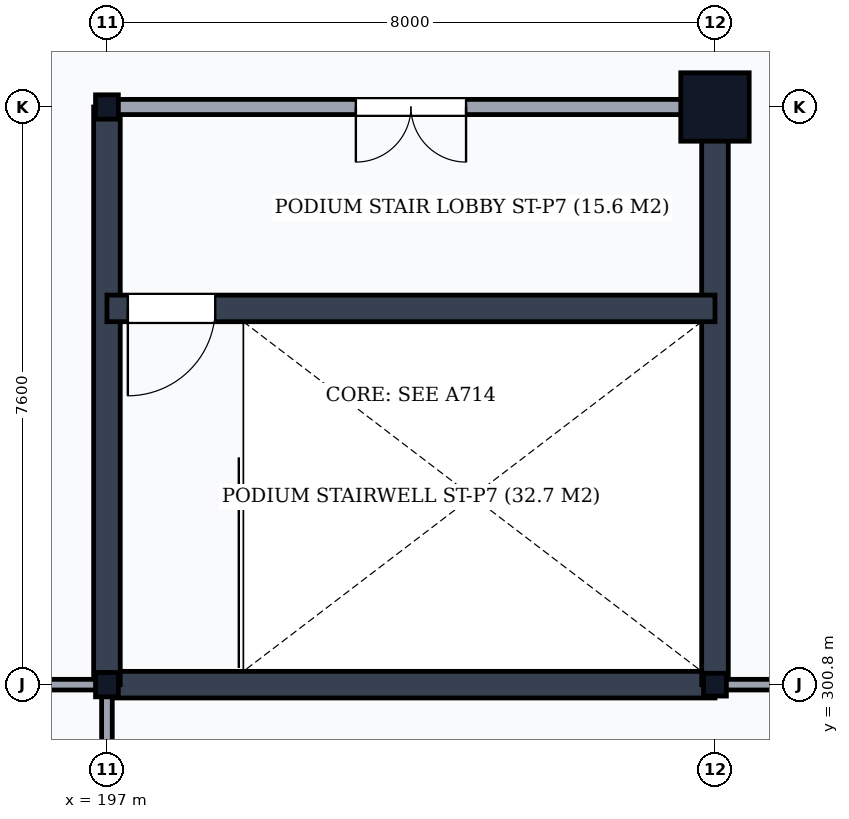
"""IFC4 building model, lengths in metres.
Left out: names, types, materials, properties, quantities, classifications, styles, units other than length and angle.
Written with IfcOpenShell. Run it as: python <this file> out.ifc"""

import sys

from ifc_helpers import new_model, si_unit, direction, frame, frame_2d, origin, origin_2d, place, context, subcontext, project, spatial, rectangle, circle, i_section, extrude, element, fill, save


model = new_model("IFC4")
c1 = context("Model", 3, precision=1e-05, world=origin(), true_north=direction((0.0, 1.0)))
c2 = subcontext(c1, "Body", "Model", "MODEL_VIEW")
j1 = project(units=[si_unit("LENGTHUNIT", "METRE"), si_unit("PLANEANGLEUNIT", "RADIAN")], contexts=[c1])
p1 = place(None, origin())
s1 = spatial("IfcSite", under=j1, at=p1, CompositionType="ELEMENT")
p2 = place(p1, origin())
s2 = spatial("IfcBuilding", under=s1, at=p2, CompositionType="ELEMENT")
p3 = place(p2, frame((0.0, 0.0, 15.6)))
s3 = spatial("IfcBuildingStorey", under=s2, at=p3, CompositionType="ELEMENT", Elevation=15.6)
for number, where, z_axis, x_axis in (
    (1, (197.0, 300.8, 0.0), (0.0, 0.0, 1.0), (1.0, 0.0, 0.0)),
    (2, (197.0, 308.4, 0.0), (0.0, 0.0, 1.0), (1.0, 0.0, 0.0)),
):
    element("IfcColumn", number, at=place(p3, frame(where, z_axis=z_axis, x_axis=x_axis)), inside=s3, PredefinedType="COLUMN", context=c2, shape_type="SweptSolid", body=[
        extrude(i_section(OverallWidth=0.3, OverallDepth=0.32, WebThickness=0.011, FlangeThickness=0.021, FilletRadius=0.027, at=origin_2d()), origin(), (0.0, 0.0, 1.0), 4.8),
    ])
p4 = place(p3, frame((205.0, 300.8, 0.0), z_axis=(0.0, 0.0, 1.0), x_axis=(1.0, 0.0, 0.0)))
e3 = element("IfcColumn", 3, at=p4, inside=s3, PredefinedType="COLUMN", context=c2, shape_type="SweptSolid", body=[
    extrude(i_section(OverallWidth=0.3, OverallDepth=0.3, WebThickness=0.011, FlangeThickness=0.019, FilletRadius=0.027, at=origin_2d()), origin(), (0.0, 0.0, 1.0), 4.8),
])
p5 = place(p3, frame((205.0, 308.4, 0.0), z_axis=(0.0, 0.0, 1.0), x_axis=(1.0, 0.0, 0.0)))
e4 = element("IfcColumn", 4, at=p5, inside=s3, PredefinedType="COLUMN", context=c2, shape_type="SweptSolid", body=[
    extrude(circle(Radius=0.45, at=origin_2d()), origin(), (0.0, 0.0, 1.0), 4.8),
])
p6 = place(p3, frame((197.0, 300.8, 0.0), z_axis=(0.0, 0.0, 1.0), x_axis=(1.0, 0.0, 0.0)))
e5 = element("IfcWall", 5, at=p6, inside=s3, PredefinedType="SHEAR", context=c2, shape_type="SweptSolid", body=[
    extrude(rectangle(XDim=8.0, YDim=0.35, at=frame_2d((4.0, 0.0))), origin(), (0.0, 0.0, 1.0), 4.48),
])
for number, where, z_axis, x_axis in (
    (6, (197.0, 300.8, 0.0), (0.0, 0.0, 1.0), (0.0, 1.0, 0.0)),
    (7, (205.0, 300.8, 0.0), (0.0, 0.0, 1.0), (0.0, 1.0, 0.0)),
):
    element("IfcWall", number, at=place(p3, frame(where, z_axis=z_axis, x_axis=x_axis)), inside=s3, PredefinedType="SHEAR", context=c2, shape_type="SweptSolid", body=[
        extrude(rectangle(XDim=7.6, YDim=0.35, at=frame_2d((3.8, 0.0))), origin(), (0.0, 0.0, 1.0), 4.48),
    ])
p7 = place(p3, frame((197.0, 305.75, 0.0), z_axis=(0.0, 0.0, 1.0), x_axis=(1.0, 0.0, 0.0)))
e8 = element("IfcWall", 8, at=p7, inside=s3, PredefinedType="SHEAR", context=c2, shape_type="SweptSolid", body=[
    extrude(rectangle(XDim=8.0, YDim=0.35, at=frame_2d((4.0, 0.0))), origin(), (0.0, 0.0, 1.0), 4.48),
])
p8 = place(p7, frame((0.275, 0.0, 0.0)))
e9 = element("IfcOpeningElement", 9, at=p8, cuts=e8, PredefinedType="OPENING", context=c2, shape_type="SweptSolid", body=[
    extrude(rectangle(XDim=1.15, YDim=2.15, at=frame_2d((0.575, 1.075))), frame((0.0, 0.19, 0.0), z_axis=(0.0, -1.0, 0.0), x_axis=(1.0, 0.0, 0.0)), (0.0, 0.0, 1.0), 0.38),
])
p9 = place(p3, frame((197.0, 308.4, 0.0), z_axis=(0.0, 0.0, 1.0), x_axis=(1.0, 0.0, 0.0)))
e10 = element("IfcWall", 10, at=p9, inside=s3, PredefinedType="PARTITIONING", context=c2, shape_type="SweptSolid", body=[
    extrude(rectangle(XDim=8.0, YDim=0.2, at=frame_2d((4.0, 0.0))), origin(), (0.0, 0.0, 1.0), 3.928),
])
p10 = place(p9, frame((3.275, 0.0, 0.0)))
e11 = element("IfcOpeningElement", 11, at=p10, cuts=e10, PredefinedType="OPENING", context=c2, shape_type="SweptSolid", body=[
    extrude(rectangle(XDim=1.45, YDim=2.2, at=frame_2d((0.725, 1.1))), frame((0.0, 0.115, 0.0), z_axis=(0.0, -1.0, 0.0), x_axis=(1.0, 0.0, 0.0)), (0.0, 0.0, 1.0), 0.23),
])
p11 = place(p3, frame((197.0, 258.2, 0.0), z_axis=(0.0, 0.0, 1.0), x_axis=(0.0, 1.0, 0.0)))
e12 = element("IfcWall", 12, at=p11, inside=s3, PredefinedType="PARTITIONING", context=c2, shape_type="SweptSolid", body=[
    extrude(rectangle(XDim=42.6, YDim=0.14, at=frame_2d((21.3, 0.0))), origin(), (0.0, 0.0, 1.0), 3.928),
])
p12 = place(p3, frame((165.0, 300.8, 0.0), z_axis=(0.0, 0.0, 1.0), x_axis=(1.0, 0.0, 0.0)))
e13 = element("IfcWall", 13, at=p12, inside=s3, PredefinedType="PARTITIONING", context=c2, shape_type="SweptSolid", body=[
    extrude(rectangle(XDim=32.0, YDim=0.14, at=frame_2d((16.0, 0.0))), origin(), (0.0, 0.0, 1.0), 3.928),
])
p13 = place(p3, frame((205.0, 300.8, 0.0), z_axis=(0.0, 0.0, 1.0), x_axis=(1.0, 0.0, 0.0)))
e14 = element("IfcWall", 14, at=p13, inside=s3, PredefinedType="PARTITIONING", context=c2, shape_type="SweptSolid", body=[
    extrude(rectangle(XDim=41.0, YDim=0.14, at=frame_2d((20.5, 0.0))), origin(), (0.0, 0.0, 1.0), 3.898),
])
p14 = place(p8, frame((1.15, 0.0, 0.0), z_axis=(0.0, 0.0, 1.0), x_axis=(-1.0, 0.0, 0.0)))
e15 = element("IfcDoor", 15, at=p14, inside=s3, OperationType="SINGLE_SWING_RIGHT", PredefinedType="DOOR", context=c2, shape_type="SweptSolid", body=[
    extrude(rectangle(XDim=1.15, YDim=2.15, at=frame_2d((0.575, 1.075))), frame((0.0, 0.025, 0.0), z_axis=(0.0, -1.0, 0.0), x_axis=(1.0, 0.0, 0.0)), (0.0, 0.0, 1.0), 0.05),
])
fill(e9, e15)
p15 = place(p10, frame((1.45, 0.0, 0.0), z_axis=(0.0, 0.0, 1.0), x_axis=(-1.0, 0.0, 0.0)))
e16 = element("IfcDoor", 16, at=p15, inside=s3, OperationType="DOUBLE_DOOR_SINGLE_SWING", PredefinedType="DOOR", context=c2, shape_type="SweptSolid", body=[
    extrude(rectangle(XDim=1.45, YDim=2.2, at=frame_2d((0.725, 1.1))), frame((0.0, 0.025, 0.0), z_axis=(0.0, -1.0, 0.0), x_axis=(1.0, 0.0, 0.0)), (0.0, 0.0, 1.0), 0.05),
])
fill(e11, e16)
save(model, sys.argv[1])
